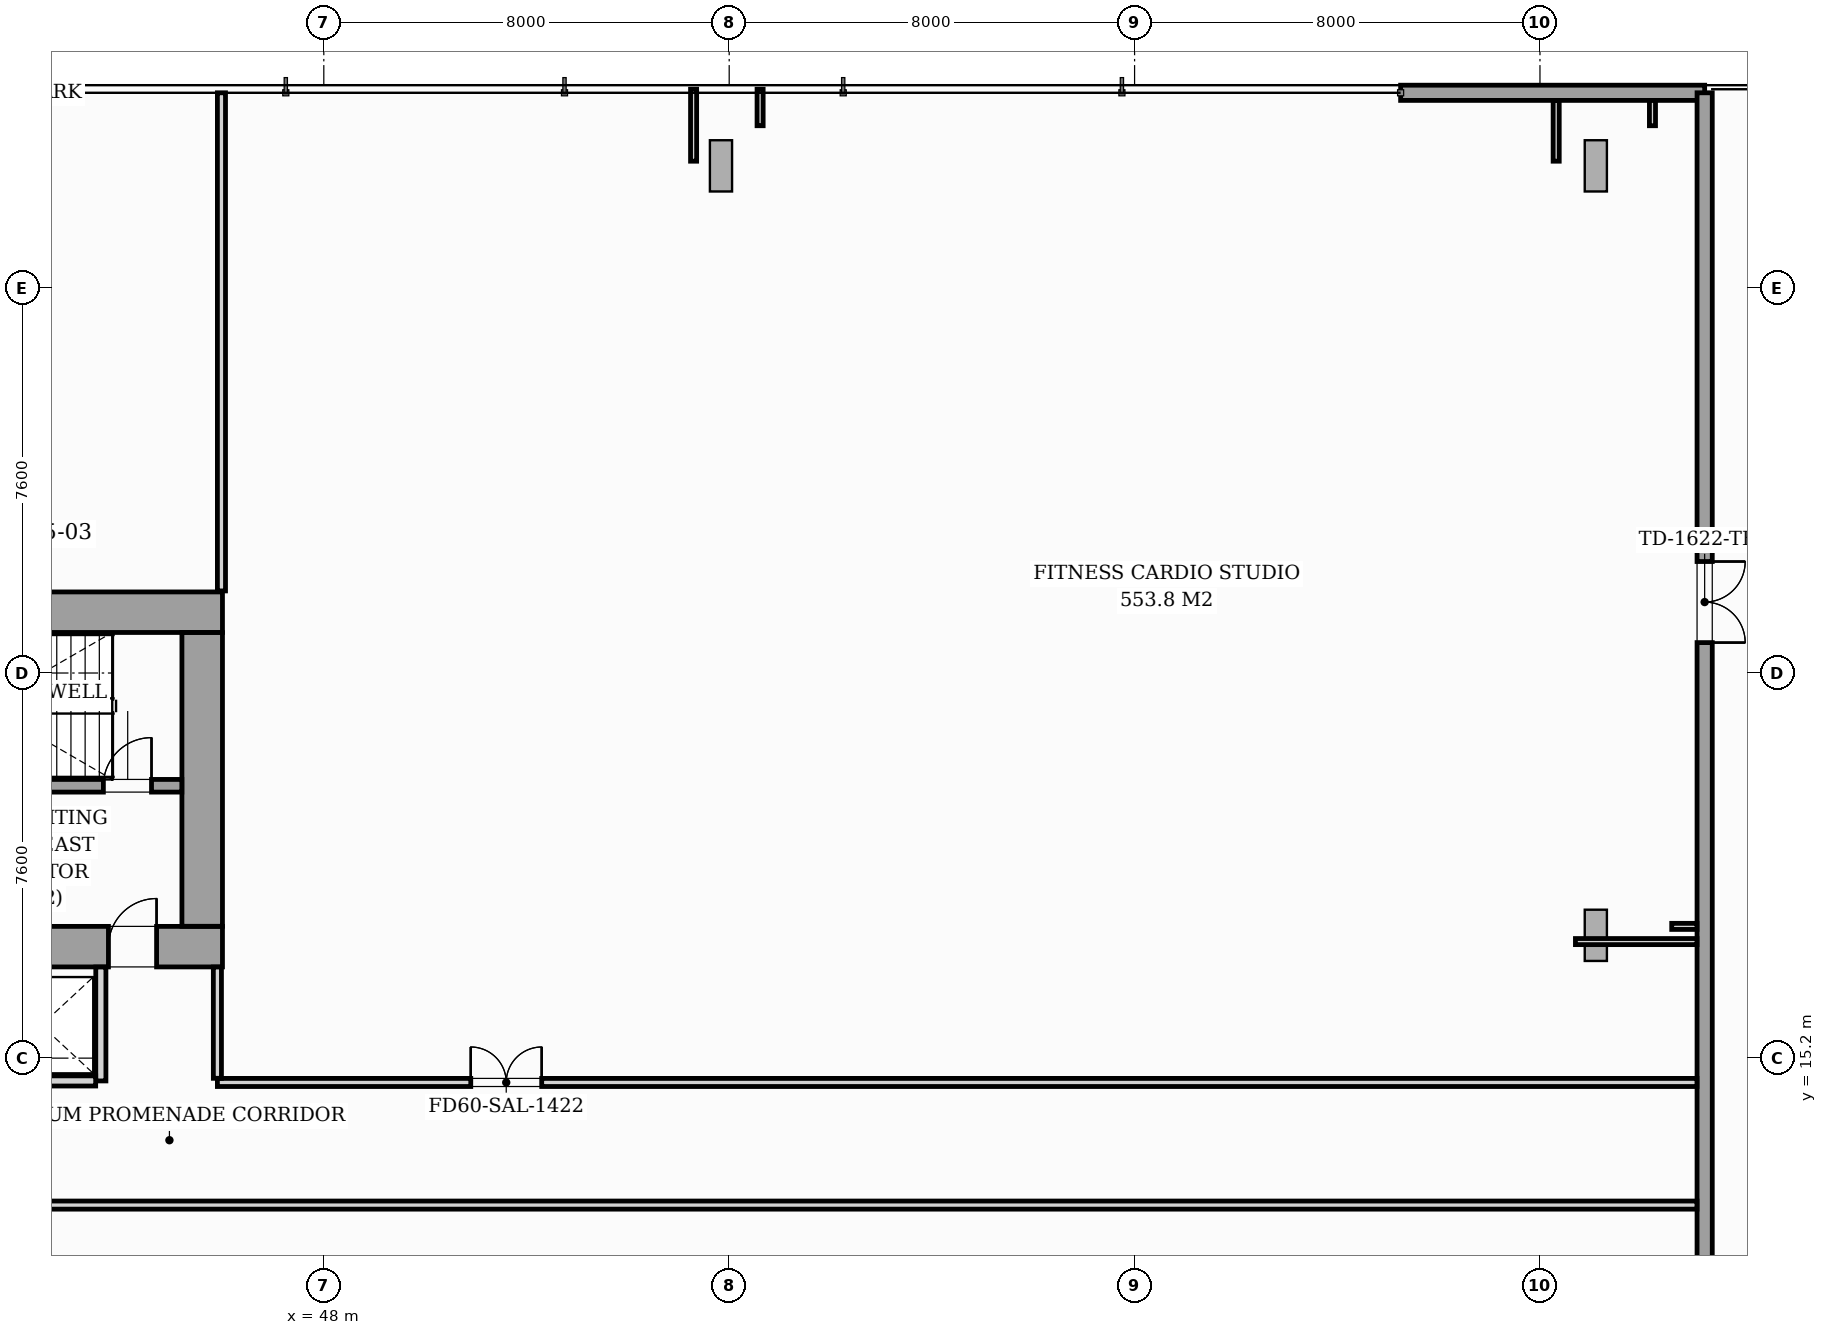
"""IFC4 building model, lengths in metres.
Left out: names, types, materials, properties, quantities, classifications, styles, units other than length and angle.
Written with IfcOpenShell. Run it as: python <this file> out.ifc"""

import sys

from ifc_helpers import new_model, si_unit, direction, frame, frame_2d, origin, origin_2d, place, context, subcontext, project, spatial, rectangle, i_section, extrude, source, transform, mapped, element, fill, save


model = new_model("IFC4")
c1 = context("Model", 3, precision=1e-05, world=origin(), true_north=direction((0.0, 1.0)))
c2 = subcontext(c1, "Body", "Model", "MODEL_VIEW")
j1 = project(units=[si_unit("LENGTHUNIT", "METRE"), si_unit("PLANEANGLEUNIT", "RADIAN")], contexts=[c1])
p1 = place(None, origin())
s1 = spatial("IfcSite", under=j1, at=p1, CompositionType="ELEMENT")
p2 = place(p1, origin())
s2 = spatial("IfcBuilding", under=s1, at=p2, CompositionType="ELEMENT")
p3 = place(p2, frame((0.0, 0.0, 9.5)))
s3 = spatial("IfcBuildingStorey", under=s2, at=p3, CompositionType="ELEMENT", Elevation=9.5)
m1 = source(origin(), c2, "Body", "SweptSolid", [
    extrude(i_section(OverallWidth=0.437, OverallDepth=0.514, WebThickness=0.061, FlangeThickness=0.097, FilletRadius=0.018, at=origin_2d()), origin(), (0.0, 0.0, 1.0), 4.496),
])
for number, where, z_axis, x_axis in (
    (1, (45.6, 17.4, 0.002), (0.0, 0.0, 1.0), (1.0, 0.0, 0.0)),
    (2, (45.6, 24.0, 0.002), (0.0, 0.0, 1.0), (1.0, 0.0, 0.0)),
):
    element("IfcColumn", number, at=place(p3, frame(where, z_axis=z_axis, x_axis=x_axis)), inside=s3, PredefinedType="PILASTER", context=c2, shape_type="MappedRepresentation", body=[
        mapped(m1, transform((0.0, 0.0, 0.0), scale=1.0)),
    ])
m2 = source(origin(), c2, "Body", "SweptSolid", [
    extrude(i_section(OverallWidth=0.438, OverallDepth=1.011, WebThickness=0.041, FlangeThickness=0.074, FilletRadius=0.024, at=origin_2d()), origin(), (0.0, 0.0, 1.0), 4.701),
])
p4 = place(p3, frame((56.519, 33.172, 0.141), z_axis=(-0.519833601905, -0.2772376628, 0.808029890942), x_axis=(0.71297149449, 0.38024196599, 0.589141490089)))
e3 = element("IfcColumn", 3, at=p4, inside=s3, PredefinedType="COLUMN", context=c2, shape_type="MappedRepresentation", body=[
    mapped(m2, transform((0.0, 0.0, 0.0), scale=1.0)),
])
m3 = source(origin(), c2, "Body", "SweptSolid", [
    extrude(i_section(OverallWidth=0.438, OverallDepth=1.011, WebThickness=0.041, FlangeThickness=0.074, FilletRadius=0.024, at=origin_2d()), origin(), (0.0, 0.0, 1.0), 5.281),
])
p5 = place(p3, frame((74.065, 33.163, 0.166), z_axis=(-0.661013793626, -0.243563031742, 0.70974489375), x_axis=(0.665973896363, 0.245390675389, 0.704458789281)))
e4 = element("IfcColumn", 4, at=p5, inside=s3, PredefinedType="COLUMN", context=c2, shape_type="MappedRepresentation", body=[
    mapped(m3, transform((0.0, 0.0, 0.0), scale=1.0)),
])
m4 = source(origin(), c2, "Body", "SweptSolid", [
    extrude(i_section(OverallWidth=0.438, OverallDepth=1.011, WebThickness=0.041, FlangeThickness=0.074, FilletRadius=0.024, at=origin_2d()), origin(), (0.0, 0.0, 1.0), 5.162),
])
p6 = place(p3, frame((74.069, 17.776, 0.162), z_axis=(-0.677659357083, -0.106976443975, 0.72755332189), x_axis=(0.718653886163, 0.11344790917, 0.686051137895)))
e5 = element("IfcColumn", 5, at=p6, inside=s3, PredefinedType="COLUMN", context=c2, shape_type="MappedRepresentation", body=[
    mapped(m4, transform((0.0, 0.0, 0.0), scale=1.0)),
])
p7 = place(p3, frame((69.25, 34.25, 0.0), z_axis=(0.0, 0.0, 1.0), x_axis=(1.0, 0.0, 0.0)))
e6 = element("IfcWall", 6, at=p7, inside=s3, PredefinedType="STANDARD", context=c2, shape_type="SweptSolid", body=[
    extrude(rectangle(XDim=6.0, YDim=0.3, at=frame_2d((3.0, 0.0))), origin(), (0.0, 0.0, 1.0), 4.08),
])
p8 = place(p3, frame((75.25, 34.25, 0.0), z_axis=(0.0, 0.0, 1.0), x_axis=(0.0, -1.0, 0.0)))
e7 = element("IfcWall", 7, at=p8, inside=s3, PredefinedType="STANDARD", context=c2, shape_type="SweptSolid", body=[
    extrude(rectangle(XDim=32.9, YDim=0.3, at=frame_2d((16.45, 0.0))), origin(), (0.0, 0.0, 1.0), 4.08),
])
p9 = place(p8, frame((9.25, 0.0, 0.0)))
e8 = element("IfcOpeningElement", 8, at=p9, cuts=e7, PredefinedType="OPENING", context=c2, shape_type="SweptSolid", body=[
    extrude(rectangle(XDim=1.6, YDim=2.1, at=frame_2d((0.8, 1.05))), frame((0.0, 0.16, 0.0), z_axis=(0.0, -1.0, 0.0), x_axis=(1.0, 0.0, 0.0)), (0.0, 0.0, 1.0), 0.32),
])
p10 = place(p8, frame((27.05, 0.0, 0.9)))
e9 = element("IfcOpeningElement", 9, at=p10, cuts=e7, PredefinedType="OPENING", context=c2, shape_type="SweptSolid", body=[
    extrude(rectangle(XDim=2.0, YDim=2.4, at=frame_2d((1.0, 1.2))), frame((0.0, 0.16, 0.0), z_axis=(0.0, -1.0, 0.0), x_axis=(1.0, 0.0, 0.0)), (0.0, 0.0, 1.0), 0.32),
])
p11 = place(p3, frame((26.0, 17.4, 0.0), z_axis=(0.0, 0.0, 1.0), x_axis=(1.0, 0.0, 0.0)))
e10 = element("IfcWall", 10, at=p11, inside=s3, PredefinedType="SHEAR", context=c2, shape_type="SweptSolid", body=[
    extrude(rectangle(XDim=20.0, YDim=0.8, at=frame_2d((10.0, 0.0))), origin(), (0.0, 0.0, 1.0), 4.5),
])
p12 = place(p11, frame((1.15, 0.0, 0.0)))
e11 = element("IfcOpeningElement", 11, at=p12, cuts=e10, PredefinedType="OPENING", context=c2, shape_type="SweptSolid", body=[
    extrude(rectangle(XDim=0.95, YDim=2.06, at=frame_2d((0.475, 1.03))), frame((0.0, 0.41, 0.0), z_axis=(0.0, -1.0, 0.0), x_axis=(1.0, 0.0, 0.0)), (0.0, 0.0, 1.0), 0.82),
])
p13 = place(p11, frame((9.58, 0.0, 0.0)))
e12 = element("IfcOpeningElement", 12, at=p13, cuts=e10, PredefinedType="OPENING", context=c2, shape_type="SweptSolid", body=[
    extrude(rectangle(XDim=0.9, YDim=2.06, at=frame_2d((0.45, 1.03))), frame((0.0, 0.41, 0.0), z_axis=(0.0, -1.0, 0.0), x_axis=(1.0, 0.0, 0.0)), (0.0, 0.0, 1.0), 0.82),
])
p14 = place(p11, frame((17.75, 0.0, 0.0)))
e13 = element("IfcOpeningElement", 13, at=p14, cuts=e10, PredefinedType="OPENING", context=c2, shape_type="SweptSolid", body=[
    extrude(rectangle(XDim=0.95, YDim=2.06, at=frame_2d((0.475, 1.03))), frame((0.0, 0.41, 0.0), z_axis=(0.0, -1.0, 0.0), x_axis=(1.0, 0.0, 0.0)), (0.0, 0.0, 1.0), 0.82),
])
p15 = place(p3, frame((26.0, 24.0, 0.0), z_axis=(0.0, 0.0, 1.0), x_axis=(1.0, 0.0, 0.0)))
e14 = element("IfcWall", 14, at=p15, inside=s3, PredefinedType="SHEAR", context=c2, shape_type="SweptSolid", body=[
    extrude(rectangle(XDim=20.0, YDim=0.8, at=frame_2d((10.0, 0.0))), origin(), (0.0, 0.0, 1.0), 4.5),
])
p16 = place(p3, frame((45.6, 17.802, 0.0), z_axis=(0.0, 0.0, 1.0), x_axis=(0.0, 1.0, 0.0)))
e15 = element("IfcWall", 15, at=p16, inside=s3, PredefinedType="SHEAR", context=c2, shape_type="SweptSolid", body=[
    extrude(rectangle(XDim=5.796, YDim=0.8, at=frame_2d((2.898, 0.0))), origin(), (0.0, 0.0, 1.0), 4.5),
])
p17 = place(p3, frame((37.05, 20.575, 0.0), z_axis=(0.0, 0.0, 1.0), x_axis=(1.0, 0.0, 0.0)))
e16 = element("IfcWall", 16, at=p17, inside=s3, PredefinedType="SOLIDWALL", context=c2, shape_type="SweptSolid", body=[
    extrude(rectangle(XDim=8.148, YDim=0.25, at=frame_2d((4.074, 0.0))), origin(), (0.0, 0.0, 1.0), 4.5),
])
p18 = place(p17, frame((6.6, 0.0, 0.0)))
e17 = element("IfcOpeningElement", 17, at=p18, cuts=e16, PredefinedType="OPENING", context=c2, shape_type="SweptSolid", body=[
    extrude(rectangle(XDim=0.95, YDim=2.06, at=frame_2d((0.475, 1.03))), frame((0.0, 0.135, 0.0), z_axis=(0.0, -1.0, 0.0), x_axis=(1.0, 0.0, 0.0)), (0.0, 0.0, 1.0), 0.27),
])
p19 = place(p3, frame((43.6, 14.75, 0.0), z_axis=(0.0, 0.0, 1.0), x_axis=(0.0, 1.0, 0.0)))
e18 = element("IfcWall", 18, at=p19, inside=s3, PredefinedType="PARTITIONING", context=c2, shape_type="SweptSolid", body=[
    extrude(rectangle(XDim=2.248, YDim=0.2, at=frame_2d((1.124, 0.0))), origin(), (0.0, 0.0, 1.0), 4.08),
])
p20 = place(p3, frame((41.352, 14.75, 0.0), z_axis=(0.0, 0.0, 1.0), x_axis=(1.0, 0.0, 0.0)))
e19 = element("IfcWall", 19, at=p20, inside=s3, PredefinedType="PARTITIONING", context=c2, shape_type="SweptSolid", body=[
    extrude(rectangle(XDim=2.146, YDim=0.2, at=frame_2d((1.073, 0.0))), origin(), (0.0, 0.0, 1.0), 4.08),
])
p21 = place(p3, frame((2.75, 12.3, 0.0), z_axis=(0.0, 0.0, 1.0), x_axis=(1.0, 0.0, 0.0)))
e20 = element("IfcWall", 20, at=p21, inside=s3, PredefinedType="PARTITIONING", context=c2, shape_type="SweptSolid", body=[
    extrude(rectangle(XDim=72.348, YDim=0.16, at=frame_2d((36.174, 0.0))), origin(), (0.0, 0.0, 1.0), 4.08),
])
p22 = place(p21, frame((6.5, 0.0, 0.0)))
e21 = element("IfcOpeningElement", 21, at=p22, cuts=e20, PredefinedType="OPENING", context=c2, shape_type="SweptSolid", body=[
    extrude(rectangle(XDim=1.4, YDim=2.08, at=frame_2d((0.7, 1.04))), frame((0.0, 0.09, 0.0), z_axis=(0.0, -1.0, 0.0), x_axis=(1.0, 0.0, 0.0)), (0.0, 0.0, 1.0), 0.18),
])
p23 = place(p21, frame((28.0, 0.0, 0.0)))
e22 = element("IfcOpeningElement", 22, at=p23, cuts=e20, PredefinedType="OPENING", context=c2, shape_type="SweptSolid", body=[
    extrude(rectangle(XDim=1.4, YDim=2.08, at=frame_2d((0.7, 1.04))), frame((0.0, 0.09, 0.0), z_axis=(0.0, -1.0, 0.0), x_axis=(1.0, 0.0, 0.0)), (0.0, 0.0, 1.0), 0.18),
])
p24 = place(p3, frame((45.9, 14.72, 0.0), z_axis=(0.0, 0.0, 1.0), x_axis=(1.0, 0.0, 0.0)))
e23 = element("IfcWall", 23, at=p24, inside=s3, PredefinedType="PARTITIONING", context=c2, shape_type="SweptSolid", body=[
    extrude(rectangle(XDim=29.198, YDim=0.16, at=frame_2d((14.599, 0.0))), origin(), (0.0, 0.0, 1.0), 4.08),
])
p25 = place(p24, frame((5.0, 0.0, 0.0)))
e24 = element("IfcOpeningElement", 24, at=p25, cuts=e23, PredefinedType="OPENING", context=c2, shape_type="SweptSolid", body=[
    extrude(rectangle(XDim=1.4, YDim=2.08, at=frame_2d((0.7, 1.04))), frame((0.0, 0.09, 0.0), z_axis=(0.0, -1.0, 0.0), x_axis=(1.0, 0.0, 0.0)), (0.0, 0.0, 1.0), 0.18),
])
p26 = place(p3, frame((45.98, 24.42, 0.0), z_axis=(0.0, 0.0, 1.0), x_axis=(0.0, 1.0, 0.0)))
e25 = element("IfcWall", 25, at=p26, inside=s3, PredefinedType="PARTITIONING", context=c2, shape_type="SweptSolid", body=[
    extrude(rectangle(XDim=9.83, YDim=0.16, at=frame_2d((4.915, 0.0))), origin(), (0.0, 0.0, 1.0), 4.08),
])
p27 = place(p3, frame((45.9, 14.802, 0.0), z_axis=(0.0, 0.0, 1.0), x_axis=(0.0, 1.0, 0.0)))
e26 = element("IfcWall", 26, at=p27, inside=s3, PredefinedType="PARTITIONING", context=c2, shape_type="SweptSolid", body=[
    extrude(rectangle(XDim=2.196, YDim=0.16, at=frame_2d((1.098, 0.0))), origin(), (0.0, 0.0, 1.0), 4.08),
])
p28 = place(p3, frame((55.298, 32.9, 0.0), z_axis=(0.0, 0.0, 1.0), x_axis=(0.0, 1.0, 0.0)))
e27 = element("IfcWall", 27, at=p28, inside=s3, PredefinedType="PARTITIONING", context=c2, shape_type="SweptSolid", body=[
    extrude(rectangle(XDim=1.42, YDim=0.12, at=frame_2d((0.71, 0.0))), origin(), (0.0, 0.0, 1.0), 4.08),
])
p29 = place(p3, frame((72.32, 32.9, 0.0), z_axis=(0.0, 0.0, 1.0), x_axis=(0.0, 1.0, 0.0)))
e28 = element("IfcWall", 28, at=p29, inside=s3, PredefinedType="PARTITIONING", context=c2, shape_type="SweptSolid", body=[
    extrude(rectangle(XDim=1.198, YDim=0.12, at=frame_2d((0.599, 0.0))), origin(), (0.0, 0.0, 1.0), 4.08),
])
p30 = place(p3, frame((72.7, 17.5, 0.0), z_axis=(0.0, 0.0, 1.0), x_axis=(1.0, 0.0, 0.0)))
e29 = element("IfcWall", 29, at=p30, inside=s3, PredefinedType="PARTITIONING", context=c2, shape_type="SweptSolid", body=[
    extrude(rectangle(XDim=2.398, YDim=0.12, at=frame_2d((1.199, 0.0))), origin(), (0.0, 0.0, 1.0), 4.08),
])
p31 = place(p3, frame((56.61, 33.6, 0.0), z_axis=(0.0, 0.0, 1.0), x_axis=(0.0, 1.0, 0.0)))
e30 = element("IfcWall", 30, at=p31, inside=s3, PredefinedType="PARTITIONING", context=c2, shape_type="SweptSolid", body=[
    extrude(rectangle(XDim=0.72, YDim=0.12, at=frame_2d((0.36, 0.0))), origin(), (0.0, 0.0, 1.0), 4.08),
])
for number, where, z_axis, x_axis in (
    (31, (74.22, 33.6, 0.0), (0.0, 0.0, 1.0), (0.0, 1.0, 0.0)),
    (32, (74.6, 17.8, 0.0), (0.0, 0.0, 1.0), (1.0, 0.0, 0.0)),
):
    element("IfcWall", number, at=place(p3, frame(where, z_axis=z_axis, x_axis=x_axis)), inside=s3, PredefinedType="PARTITIONING", context=c2, shape_type="SweptSolid", body=[
        extrude(rectangle(XDim=0.498, YDim=0.12, at=frame_2d((0.249, 0.0))), origin(), (0.0, 0.0, 1.0), 4.08),
    ])
m5 = source(origin(), c2, "Body", "SweptSolid", [
    extrude(rectangle(XDim=1.6, YDim=2.1, at=frame_2d((0.8, 1.05))), frame((0.0, 0.025, 0.0), z_axis=(0.0, -1.0, 0.0), x_axis=(1.0, 0.0, 0.0)), (0.0, 0.0, 1.0), 0.05),
])
p32 = place(p9, origin())
e33 = element("IfcDoor", 33, at=p32, inside=s3, OperationType="DOUBLE_DOOR_SINGLE_SWING", PredefinedType="DOOR", context=c2, shape_type="MappedRepresentation", body=[
    mapped(m5, transform((0.0, 0.0, 0.0), scale=1.0)),
])
fill(e8, e33)
m6 = source(origin(), c2, "Body", "SweptSolid", [
    extrude(rectangle(XDim=0.95, YDim=2.06, at=frame_2d((0.475, 1.03))), frame((0.0, 0.025, 0.0), z_axis=(0.0, -1.0, 0.0), x_axis=(1.0, 0.0, 0.0)), (0.0, 0.0, 1.0), 0.05),
])
p33 = place(p14, origin())
e34 = element("IfcDoor", 34, at=p33, inside=s3, OperationType="SINGLE_SWING_RIGHT", PredefinedType="DOOR", context=c2, shape_type="MappedRepresentation", body=[
    mapped(m6, transform((0.0, 0.0, 0.0), scale=1.0)),
])
fill(e13, e34)
p34 = place(p18, origin())
e35 = element("IfcDoor", 35, at=p34, inside=s3, OperationType="SINGLE_SWING_RIGHT", PredefinedType="DOOR", context=c2, shape_type="MappedRepresentation", body=[
    mapped(m6, transform((0.0, 0.0, 0.0), scale=1.0)),
])
fill(e17, e35)
m7 = source(origin(), c2, "Body", "SweptSolid", [
    extrude(rectangle(XDim=1.4, YDim=2.08, at=frame_2d((0.7, 1.04))), frame((0.0, 0.025, 0.0), z_axis=(0.0, -1.0, 0.0), x_axis=(1.0, 0.0, 0.0)), (0.0, 0.0, 1.0), 0.05),
])
p35 = place(p25, origin())
e36 = element("IfcDoor", 36, at=p35, inside=s3, OperationType="DOUBLE_DOOR_SINGLE_SWING", PredefinedType="DOOR", context=c2, shape_type="MappedRepresentation", body=[
    mapped(m7, transform((0.0, 0.0, 0.0), scale=1.0)),
])
fill(e24, e36)
save(model, sys.argv[1])
